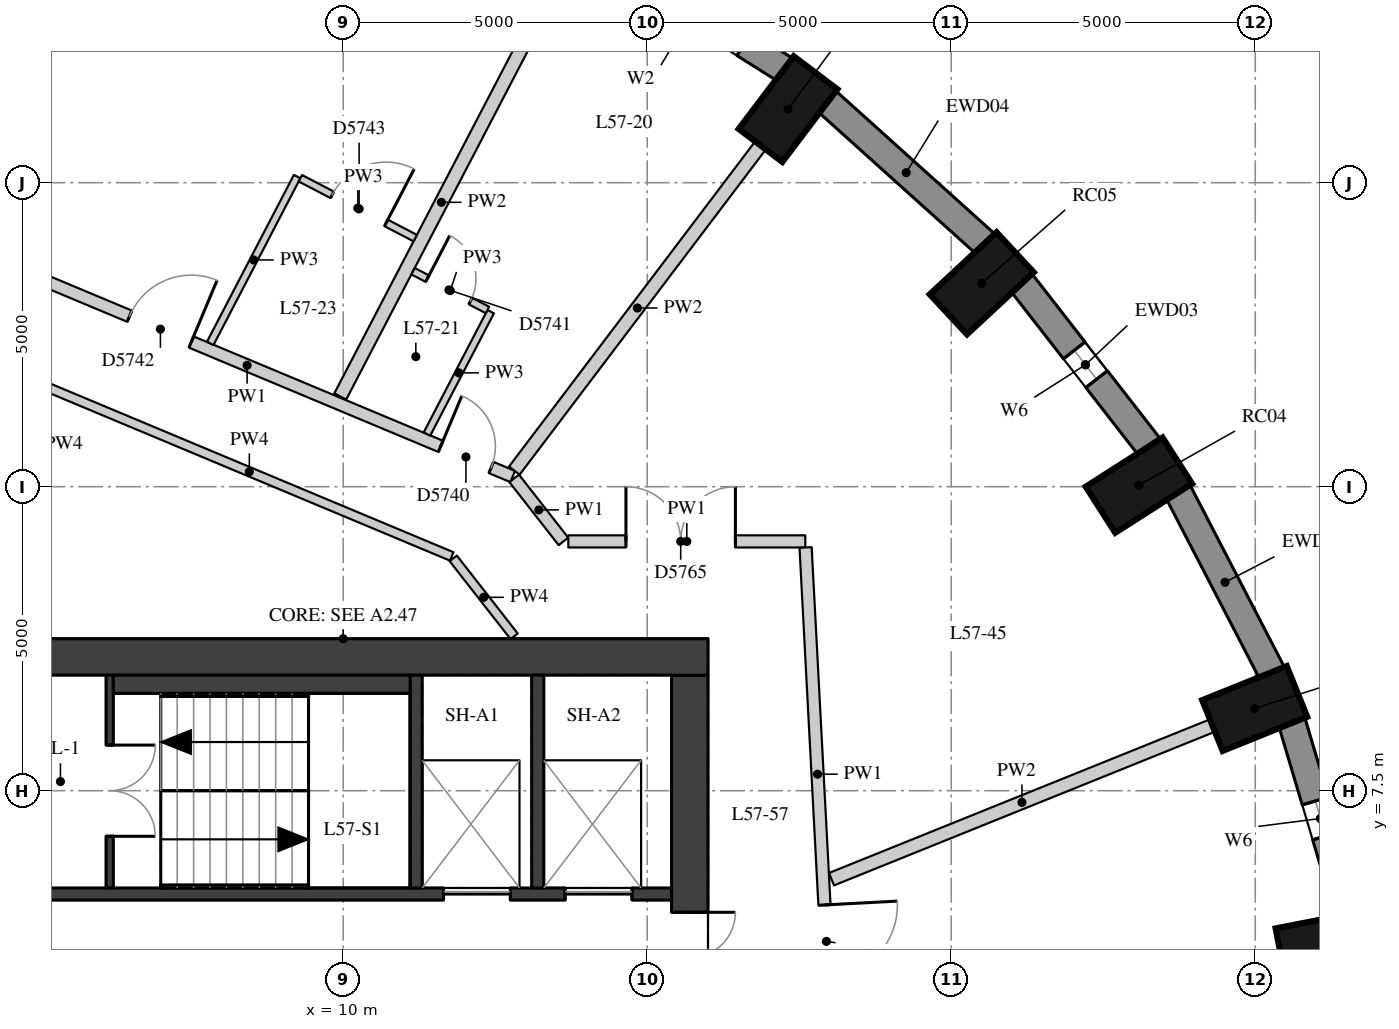
"""IFC4 building model, lengths in metres.
Left out: names, types, materials, properties, quantities, classifications, styles, units other than length and angle.
Written with IfcOpenShell. Run it as: python <this file> out.ifc"""

import sys

from ifc_helpers import new_model, si_unit, direction, frame, frame_2d, origin, origin_2d, place, context, subcontext, project, spatial, rectangle, extrude, element, fill, save


model = new_model("IFC4")
c1 = context("Model", 3, precision=1e-05, world=origin(), true_north=direction((0.0, 1.0)))
c2 = subcontext(c1, "Body", "Model", "MODEL_VIEW")
j1 = project(units=[si_unit("LENGTHUNIT", "METRE"), si_unit("PLANEANGLEUNIT", "RADIAN")], contexts=[c1])
p1 = place(None, origin())
s1 = spatial("IfcSite", under=j1, at=p1, CompositionType="ELEMENT")
p2 = place(p1, origin())
s2 = spatial("IfcBuilding", under=s1, at=p2, CompositionType="ELEMENT")
p3 = place(p2, frame((0.0, 0.0, 202.4)))
s3 = spatial("IfcBuildingStorey", under=s2, at=p3, CompositionType="ELEMENT", Elevation=202.4)
for number, where, z_axis, x_axis in (
    (1, (26.157, 4.937, 0.0), (0.0, 0.0, 1.0), (0.981, 0.192, 0.0)),
    (2, (24.991, 8.852, 0.0), (0.0, 0.0, 1.0), (0.927, 0.374, 0.0)),
    (3, (23.087, 12.525, 0.0), (0.0, 0.0, 1.0), (0.842, 0.539, 0.0)),
    (4, (20.502, 15.845, 0.0), (0.0, 0.0, 1.0), (0.732, 0.681, 0.0)),
    (5, (17.316, 18.71, 0.0), (0.0, 0.0, 1.0), (0.604, 0.797, 0.0)),
):
    element("IfcColumn", number, at=place(p3, frame(where, z_axis=z_axis, x_axis=x_axis)), inside=s3, PredefinedType="COLUMN", context=c2, shape_type="SweptSolid", body=[
        extrude(rectangle(XDim=1.5, YDim=0.9, at=origin_2d()), origin(), (0.0, 0.0, 1.0), 3.3),
    ])
p4 = place(p3, frame((26.548, 5.452, 0.0), z_axis=(0.0, 0.0, 1.0), x_axis=(-0.285444972963, 0.958395099847, 0.0)))
e6 = element("IfcWall", 6, at=p4, inside=s3, PredefinedType="SOLIDWALL", context=c2, shape_type="SweptSolid", body=[
    extrude(rectangle(XDim=3.32, YDim=0.45, at=frame_2d((1.66, 0.0))), origin(), (0.0, 0.0, 1.0), 3.02),
])
p5 = place(p4, frame((1.36, 0.0, 0.4)))
e7 = element("IfcOpeningElement", 7, at=p5, cuts=e6, PredefinedType="OPENING", context=c2, shape_type="SweptSolid", body=[
    extrude(rectangle(XDim=0.6, YDim=1.75, at=frame_2d((0.3, 0.875))), frame((0.0, 0.235, 0.0), z_axis=(0.0, -1.0, 0.0), x_axis=(1.0, 0.0, 0.0)), (0.0, 0.0, 1.0), 0.47),
])
p6 = place(p3, frame((25.278, 9.432, 0.0), z_axis=(0.0, 0.0, 1.0), x_axis=(-0.460175500475, 0.887827972505, 0.0)))
e8 = element("IfcWall", 8, at=p6, inside=s3, PredefinedType="SOLIDWALL", context=c2, shape_type="SweptSolid", body=[
    extrude(rectangle(XDim=3.371, YDim=0.45, at=frame_2d((1.685, 0.0))), origin(), (0.0, 0.0, 1.0), 3.02),
])
p7 = place(p3, frame((23.263, 13.148, 0.0), z_axis=(0.0, 0.0, 1.0), x_axis=(-0.614220816451, 0.789134201919, 0.0)))
e9 = element("IfcWall", 9, at=p7, inside=s3, PredefinedType="SOLIDWALL", context=c2, shape_type="SweptSolid", body=[
    extrude(rectangle(XDim=3.438, YDim=0.45, at=frame_2d((1.719, 0.0))), origin(), (0.0, 0.0, 1.0), 3.02),
])
p8 = place(p7, frame((1.419, 0.0, 0.4)))
e10 = element("IfcOpeningElement", 10, at=p8, cuts=e9, PredefinedType="OPENING", context=c2, shape_type="SweptSolid", body=[
    extrude(rectangle(XDim=0.6, YDim=1.75, at=frame_2d((0.3, 0.875))), frame((0.0, 0.235, 0.0), z_axis=(0.0, -1.0, 0.0), x_axis=(1.0, 0.0, 0.0)), (0.0, 0.0, 1.0), 0.47),
])
p9 = place(p3, frame((20.565, 16.49, 0.0), z_axis=(0.0, 0.0, 1.0), x_axis=(-0.743442727602, 0.668799604348, 0.0)))
e11 = element("IfcWall", 11, at=p9, inside=s3, PredefinedType="SOLIDWALL", context=c2, shape_type="SweptSolid", body=[
    extrude(rectangle(XDim=3.513, YDim=0.45, at=frame_2d((1.756, 0.0))), origin(), (0.0, 0.0, 1.0), 3.02),
])
p10 = place(p3, frame((17.267, 19.358, 0.0), z_axis=(0.0, 0.0, 1.0), x_axis=(-0.846119146727, 0.532993798783, 0.0)))
e12 = element("IfcWall", 12, at=p10, inside=s3, PredefinedType="SOLIDWALL", context=c2, shape_type="SweptSolid", body=[
    extrude(rectangle(XDim=3.587, YDim=0.45, at=frame_2d((1.793, 0.0))), origin(), (0.0, 0.0, 1.0), 3.02),
])
p11 = place(p10, frame((0.793, 0.0, 0.4)))
e13 = element("IfcOpeningElement", 13, at=p11, cuts=e12, PredefinedType="OPENING", context=c2, shape_type="SweptSolid", body=[
    extrude(rectangle(XDim=2.0, YDim=1.75, at=frame_2d((1.0, 0.875))), frame((0.0, 0.235, 0.0), z_axis=(0.0, -1.0, 0.0), x_axis=(1.0, 0.0, 0.0)), (0.0, 0.0, 1.0), 0.47),
])
p12 = place(p3, frame((15.7, -9.4, 0.0), z_axis=(0.0, 0.0, 1.0), x_axis=(0.0, 1.0, 0.0)))
e14 = element("IfcWall", 14, at=p12, inside=s3, PredefinedType="SHEAR", context=c2, shape_type="SweptSolid", body=[
    extrude(rectangle(XDim=18.8, YDim=0.6, at=frame_2d((9.4, 0.0))), origin(), (0.0, 0.0, 1.0), 3.02),
])
p13 = place(p12, frame((13.4, 0.0, 0.0)))
e15 = element("IfcOpeningElement", 15, at=p13, cuts=e14, PredefinedType="OPENING", context=c2, shape_type="SweptSolid", body=[
    extrude(rectangle(XDim=1.5, YDim=2.1, at=frame_2d((0.75, 1.05))), frame((0.0, 0.31, 0.0), z_axis=(0.0, -1.0, 0.0), x_axis=(1.0, 0.0, 0.0)), (0.0, 0.0, 1.0), 0.62),
])
p14 = place(p12, frame((3.9, 0.0, 0.0)))
e16 = element("IfcOpeningElement", 16, at=p14, cuts=e14, PredefinedType="OPENING", context=c2, shape_type="SweptSolid", body=[
    extrude(rectangle(XDim=1.5, YDim=2.1, at=frame_2d((0.75, 1.05))), frame((0.0, 0.31, 0.0), z_axis=(0.0, -1.0, 0.0), x_axis=(1.0, 0.0, 0.0)), (0.0, 0.0, 1.0), 0.62),
])
p15 = place(p3, frame((4.0, 9.7, 0.0), z_axis=(0.0, 0.0, 1.0), x_axis=(1.0, 0.0, 0.0)))
e17 = element("IfcWall", 17, at=p15, inside=s3, PredefinedType="SHEAR", context=c2, shape_type="SweptSolid", body=[
    extrude(rectangle(XDim=12.0, YDim=0.6, at=frame_2d((6.0, 0.0))), origin(), (0.0, 0.0, 1.0), 3.02),
])
p16 = place(p3, frame((4.6, 5.8, 0.0), z_axis=(0.0, 0.0, 1.0), x_axis=(1.0, 0.0, 0.0)))
e18 = element("IfcWall", 18, at=p16, inside=s3, PredefinedType="SHEAR", context=c2, shape_type="SweptSolid", body=[
    extrude(rectangle(XDim=10.8, YDim=0.2, at=frame_2d((5.4, 0.0))), origin(), (0.0, 0.0, 1.0), 3.02),
])
p17 = place(p16, frame((7.05, 0.0, 0.0)))
e19 = element("IfcOpeningElement", 19, at=p17, cuts=e18, PredefinedType="OPENING", context=c2, shape_type="SweptSolid", body=[
    extrude(rectangle(XDim=1.1, YDim=2.1, at=frame_2d((0.55, 1.05))), frame((0.0, 0.11, 0.0), z_axis=(0.0, -1.0, 0.0), x_axis=(1.0, 0.0, 0.0)), (0.0, 0.0, 1.0), 0.22),
])
p18 = place(p16, frame((9.05, 0.0, 0.0)))
e20 = element("IfcOpeningElement", 20, at=p18, cuts=e18, PredefinedType="OPENING", context=c2, shape_type="SweptSolid", body=[
    extrude(rectangle(XDim=1.1, YDim=2.1, at=frame_2d((0.55, 1.05))), frame((0.0, 0.11, 0.0), z_axis=(0.0, -1.0, 0.0), x_axis=(1.0, 0.0, 0.0)), (0.0, 0.0, 1.0), 0.22),
])
for number, where, z_axis, x_axis in (
    (21, (11.2, 5.9, 0.0), (0.0, 0.0, 1.0), (0.0, 1.0, 0.0)),
    (22, (13.2, 5.9, 0.0), (0.0, 0.0, 1.0), (0.0, 1.0, 0.0)),
):
    element("IfcWall", number, at=place(p3, frame(where, z_axis=z_axis, x_axis=x_axis)), inside=s3, PredefinedType="SHEAR", context=c2, shape_type="SweptSolid", body=[
        extrude(rectangle(XDim=3.5, YDim=0.2, at=frame_2d((1.75, 0.0))), origin(), (0.0, 0.0, 1.0), 3.02),
    ])
p19 = place(p3, frame((6.16, 5.9, 0.0), z_axis=(0.0, 0.0, 1.0), x_axis=(0.0, 1.0, 0.0)))
e23 = element("IfcWall", 23, at=p19, inside=s3, PredefinedType="SHEAR", context=c2, shape_type="SweptSolid", body=[
    extrude(rectangle(XDim=3.5, YDim=0.12, at=frame_2d((1.75, 0.0))), origin(), (0.0, 0.0, 1.0), 3.02),
])
p20 = place(p19, frame((0.85, 0.0, 0.0)))
e24 = element("IfcOpeningElement", 24, at=p20, cuts=e23, PredefinedType="OPENING", context=c2, shape_type="SweptSolid", body=[
    extrude(rectangle(XDim=1.5, YDim=2.1, at=frame_2d((0.75, 1.05))), frame((0.0, 0.07, 0.0), z_axis=(0.0, -1.0, 0.0), x_axis=(1.0, 0.0, 0.0)), (0.0, 0.0, 1.0), 0.14),
])
p21 = place(p3, frame((6.22, 9.25, 0.0), z_axis=(0.0, 0.0, 1.0), x_axis=(1.0, 0.0, 0.0)))
e25 = element("IfcWall", 25, at=p21, inside=s3, PredefinedType="PARTITIONING", context=c2, shape_type="SweptSolid", body=[
    extrude(rectangle(XDim=4.88, YDim=0.3, at=frame_2d((2.44, 0.0))), origin(), (0.0, 0.0, 1.0), 3.02),
])
p22 = place(p3, frame((4.052, 16.323, 0.0), z_axis=(0.0, 0.0, 1.0), x_axis=(0.922513794011, -0.385964117322, 0.0)))
e26 = element("IfcWall", 26, at=p22, inside=s3, PredefinedType="PARTITIONING", context=c2, shape_type="SweptSolid", body=[
    extrude(rectangle(XDim=9.47, YDim=0.2, at=frame_2d((4.735, 0.0))), origin(), (0.0, 0.0, 1.0), 3.02),
])
p23 = place(p22, frame((8.186, 0.0, 0.0)))
e27 = element("IfcOpeningElement", 27, at=p23, cuts=e26, PredefinedType="OPENING", context=c2, shape_type="SweptSolid", body=[
    extrude(rectangle(XDim=0.9, YDim=2.1, at=frame_2d((0.45, 1.05))), frame((0.0, 0.11, 0.0), z_axis=(0.0, -1.0, 0.0), x_axis=(1.0, 0.0, 0.0)), (0.0, 0.0, 1.0), 0.22),
])
p24 = place(p22, frame((2.639, 0.0, 0.0)))
e28 = element("IfcOpeningElement", 28, at=p24, cuts=e26, PredefinedType="OPENING", context=c2, shape_type="SweptSolid", body=[
    extrude(rectangle(XDim=1.1, YDim=2.1, at=frame_2d((0.55, 1.05))), frame((0.0, 0.11, 0.0), z_axis=(0.0, -1.0, 0.0), x_axis=(1.0, 0.0, 0.0)), (0.0, 0.0, 1.0), 0.22),
])
p25 = place(p3, frame((12.812, 12.636, 0.0), z_axis=(0.0, 0.0, 1.0), x_axis=(0.616123044723, -0.787649918277, 0.0)))
e29 = element("IfcWall", 29, at=p25, inside=s3, PredefinedType="PARTITIONING", context=c2, shape_type="SweptSolid", body=[
    extrude(rectangle(XDim=1.315, YDim=0.2, at=frame_2d((0.658, 0.0))), origin(), (0.0, 0.0, 1.0), 3.02),
])
p26 = place(p3, frame((13.703, 11.6, 0.0), z_axis=(0.0, 0.0, 1.0), x_axis=(1.0, 0.0, 0.0)))
e30 = element("IfcWall", 30, at=p26, inside=s3, PredefinedType="PARTITIONING", context=c2, shape_type="SweptSolid", body=[
    extrude(rectangle(XDim=3.897, YDim=0.2, at=frame_2d((1.949, 0.0))), origin(), (0.0, 0.0, 1.0), 3.02),
])
p27 = place(p26, frame((0.948, 0.0, 0.0)))
e31 = element("IfcOpeningElement", 31, at=p27, cuts=e30, PredefinedType="OPENING", context=c2, shape_type="SweptSolid", body=[
    extrude(rectangle(XDim=1.8, YDim=2.1, at=frame_2d((0.9, 1.05))), frame((0.0, 0.11, 0.0), z_axis=(0.0, -1.0, 0.0), x_axis=(1.0, 0.0, 0.0)), (0.0, 0.0, 1.0), 0.22),
])
p28 = place(p3, frame((17.605, 11.5, 0.0), z_axis=(0.0, 0.0, 1.0), x_axis=(0.052701255232, -0.998610323248, 0.0)))
e32 = element("IfcWall", 32, at=p28, inside=s3, PredefinedType="PARTITIONING", context=c2, shape_type="SweptSolid", body=[
    extrude(rectangle(XDim=7.468, YDim=0.2, at=frame_2d((3.734, 0.0))), origin(), (0.0, 0.0, 1.0), 3.02),
])
p29 = place(p28, frame((5.887, 0.0, 0.0)))
e33 = element("IfcOpeningElement", 33, at=p29, cuts=e32, PredefinedType="OPENING", context=c2, shape_type="SweptSolid", body=[
    extrude(rectangle(XDim=1.2, YDim=2.1, at=frame_2d((0.6, 1.05))), frame((0.0, 0.11, 0.0), z_axis=(0.0, -1.0, 0.0), x_axis=(1.0, 0.0, 0.0)), (0.0, 0.0, 1.0), 0.22),
])
p30 = place(p3, frame((5.128, 14.138, 0.0), z_axis=(0.0, 0.0, 1.0), x_axis=(0.922514397623, -0.385962674591, 0.0)))
e34 = element("IfcWall", 34, at=p30, inside=s3, PredefinedType="PARTITIONING", context=c2, shape_type="SweptSolid", body=[
    extrude(rectangle(XDim=7.216, YDim=0.15, at=frame_2d((3.608, 0.0))), origin(), (0.0, 0.0, 1.0), 3.02),
])
p31 = place(p3, frame((11.81, 11.321, 0.0), z_axis=(0.0, 0.0, 1.0), x_axis=(0.615964296608, -0.787774069962, 0.0)))
e35 = element("IfcWall", 35, at=p31, inside=s3, PredefinedType="PARTITIONING", context=c2, shape_type="SweptSolid", body=[
    extrude(rectangle(XDim=1.627, YDim=0.15, at=frame_2d((0.813, 0.0))), origin(), (0.0, 0.0, 1.0), 3.02),
])
p32 = place(p3, frame((24.295, 8.571, 0.0), z_axis=(0.0, 0.0, 1.0), x_axis=(-0.927395972896, -0.374081153571, 0.0)))
e36 = element("IfcWall", 36, at=p32, inside=s3, PredefinedType="PARTITIONING", context=c2, shape_type="SweptSolid", body=[
    extrude(rectangle(XDim=6.755, YDim=0.22, at=frame_2d((3.377, 0.0))), origin(), (0.0, 0.0, 1.0), 3.02),
])
p33 = place(p3, frame((16.863, 18.113, 0.0), z_axis=(0.0, 0.0, 1.0), x_axis=(-0.603604669643, -0.797283765535, 0.0)))
e37 = element("IfcWall", 37, at=p33, inside=s3, PredefinedType="PARTITIONING", context=c2, shape_type="SweptSolid", body=[
    extrude(rectangle(XDim=6.707, YDim=0.22, at=frame_2d((3.354, 0.0))), origin(), (0.0, 0.0, 1.0), 3.02),
])
p34 = place(p3, frame((13.279, 20.37, 0.0), z_axis=(0.0, 0.0, 1.0), x_axis=(-0.462003878414, -0.886877903846, 0.0)))
e38 = element("IfcWall", 38, at=p34, inside=s3, PredefinedType="PARTITIONING", context=c2, shape_type="SweptSolid", body=[
    extrude(rectangle(XDim=7.2, YDim=0.22, at=frame_2d((3.6, 0.0))), origin(), (0.0, 0.0, 1.0), 3.02),
])
p35 = place(p3, frame((11.378, 13.366, 0.0), z_axis=(0.0, 0.0, 1.0), x_axis=(0.461999655972, 0.886880103442, 0.0)))
e39 = element("IfcWall", 39, at=p35, inside=s3, PredefinedType="PARTITIONING", context=c2, shape_type="SweptSolid", body=[
    extrude(rectangle(XDim=2.269, YDim=0.12, at=frame_2d((1.135, 0.0))), origin(), (0.0, 0.0, 1.0), 3.02),
])
p36 = place(p3, frame((7.814, 14.857, 0.0), z_axis=(0.0, 0.0, 1.0), x_axis=(0.461958994047, 0.886901284146, 0.0)))
e40 = element("IfcWall", 40, at=p36, inside=s3, PredefinedType="PARTITIONING", context=c2, shape_type="SweptSolid", body=[
    extrude(rectangle(XDim=3.093, YDim=0.12, at=frame_2d((1.547, 0.0))), origin(), (0.0, 0.0, 1.0), 3.02),
])
p37 = place(p3, frame((12.373, 15.406, 0.0), z_axis=(0.0, 0.0, 1.0), x_axis=(-0.88690955386, 0.461943116922, 0.0)))
e41 = element("IfcWall", 41, at=p37, inside=s3, PredefinedType="PARTITIONING", context=c2, shape_type="SweptSolid", body=[
    extrude(rectangle(XDim=1.38, YDim=0.12, at=frame_2d((0.69, 0.0))), origin(), (0.0, 0.0, 1.0), 3.02),
])
p38 = place(p37, frame((0.315, 0.0, 0.0)))
e42 = element("IfcOpeningElement", 42, at=p38, cuts=e41, PredefinedType="OPENING", context=c2, shape_type="SweptSolid", body=[
    extrude(rectangle(XDim=0.8, YDim=2.1, at=frame_2d((0.4, 1.05))), frame((0.0, 0.07, 0.0), z_axis=(0.0, -1.0, 0.0), x_axis=(1.0, 0.0, 0.0)), (0.0, 0.0, 1.0), 0.14),
])
p39 = place(p3, frame((9.296, 17.573, 0.0), z_axis=(0.0, 0.0, 1.0), x_axis=(0.88685243949, -0.462052757346, 0.0)))
e43 = element("IfcWall", 43, at=p39, inside=s3, PredefinedType="PARTITIONING", context=c2, shape_type="SweptSolid", body=[
    extrude(rectangle(XDim=2.13, YDim=0.12, at=frame_2d((1.065, 0.0))), origin(), (0.0, 0.0, 1.0), 3.02),
])
p40 = place(p39, frame((0.59, 0.0, 0.0)))
e44 = element("IfcOpeningElement", 44, at=p40, cuts=e43, PredefinedType="OPENING", context=c2, shape_type="SweptSolid", body=[
    extrude(rectangle(XDim=1.0, YDim=2.1, at=frame_2d((0.5, 1.05))), frame((0.0, 0.07, 0.0), z_axis=(0.0, -1.0, 0.0), x_axis=(1.0, 0.0, 0.0)), (0.0, 0.0, 1.0), 0.14),
])
p41 = place(p5, origin())
e45 = element("IfcWindow", 45, at=p41, inside=s3, PartitioningType="SINGLE_PANEL", PredefinedType="WINDOW", context=c2, shape_type="SweptSolid", body=[
    extrude(rectangle(XDim=0.6, YDim=1.75, at=frame_2d((0.3, 0.875))), frame((0.0, 0.035, 0.0), z_axis=(0.0, -1.0, 0.0), x_axis=(1.0, 0.0, 0.0)), (0.0, 0.0, 1.0), 0.06),
])
fill(e7, e45)
p42 = place(p8, origin())
e46 = element("IfcWindow", 46, at=p42, inside=s3, PartitioningType="SINGLE_PANEL", PredefinedType="WINDOW", context=c2, shape_type="SweptSolid", body=[
    extrude(rectangle(XDim=0.6, YDim=1.75, at=frame_2d((0.3, 0.875))), frame((0.0, 0.035, 0.0), z_axis=(0.0, -1.0, 0.0), x_axis=(1.0, 0.0, 0.0)), (0.0, 0.0, 1.0), 0.06),
])
fill(e10, e46)
p43 = place(p13, origin())
e47 = element("IfcDoor", 47, at=p43, inside=s3, OperationType="DOUBLE_DOOR_SINGLE_SWING", PredefinedType="DOOR", context=c2, shape_type="SweptSolid", body=[
    extrude(rectangle(XDim=1.5, YDim=2.1, at=frame_2d((0.75, 1.05))), frame((0.0, 0.025, 0.0), z_axis=(0.0, -1.0, 0.0), x_axis=(1.0, 0.0, 0.0)), (0.0, 0.0, 1.0), 0.05),
])
fill(e15, e47)
p44 = place(p20, origin())
e48 = element("IfcDoor", 48, at=p44, inside=s3, OperationType="DOUBLE_DOOR_SINGLE_SWING", PredefinedType="DOOR", context=c2, shape_type="SweptSolid", body=[
    extrude(rectangle(XDim=1.5, YDim=2.1, at=frame_2d((0.75, 1.05))), frame((0.0, 0.025, 0.0), z_axis=(0.0, -1.0, 0.0), x_axis=(1.0, 0.0, 0.0)), (0.0, 0.0, 1.0), 0.05),
])
fill(e24, e48)
p45 = place(p17, origin())
e49 = element("IfcDoor", 49, at=p45, inside=s3, OperationType="DOUBLE_DOOR_SLIDING", PredefinedType="DOOR", context=c2, shape_type="SweptSolid", body=[
    extrude(rectangle(XDim=1.1, YDim=2.1, at=frame_2d((0.55, 1.05))), frame((0.0, 0.025, 0.0), z_axis=(0.0, -1.0, 0.0), x_axis=(1.0, 0.0, 0.0)), (0.0, 0.0, 1.0), 0.05),
])
fill(e19, e49)
p46 = place(p18, origin())
e50 = element("IfcDoor", 50, at=p46, inside=s3, OperationType="DOUBLE_DOOR_SLIDING", PredefinedType="DOOR", context=c2, shape_type="SweptSolid", body=[
    extrude(rectangle(XDim=1.1, YDim=2.1, at=frame_2d((0.55, 1.05))), frame((0.0, 0.025, 0.0), z_axis=(0.0, -1.0, 0.0), x_axis=(1.0, 0.0, 0.0)), (0.0, 0.0, 1.0), 0.05),
])
fill(e20, e50)
p47 = place(p23, origin())
e51 = element("IfcDoor", 51, at=p47, inside=s3, OperationType="SINGLE_SWING_LEFT", PredefinedType="DOOR", context=c2, shape_type="SweptSolid", body=[
    extrude(rectangle(XDim=0.9, YDim=2.1, at=frame_2d((0.45, 1.05))), frame((0.0, 0.025, 0.0), z_axis=(0.0, -1.0, 0.0), x_axis=(1.0, 0.0, 0.0)), (0.0, 0.0, 1.0), 0.05),
])
fill(e27, e51)
p48 = place(p38, origin())
e52 = element("IfcDoor", 52, at=p48, inside=s3, OperationType="SINGLE_SWING_LEFT", PredefinedType="DOOR", context=c2, shape_type="SweptSolid", body=[
    extrude(rectangle(XDim=0.8, YDim=2.1, at=frame_2d((0.4, 1.05))), frame((0.0, 0.025, 0.0), z_axis=(0.0, -1.0, 0.0), x_axis=(1.0, 0.0, 0.0)), (0.0, 0.0, 1.0), 0.05),
])
fill(e42, e52)
p49 = place(p24, origin())
e53 = element("IfcDoor", 53, at=p49, inside=s3, OperationType="SINGLE_SWING_RIGHT", PredefinedType="DOOR", context=c2, shape_type="SweptSolid", body=[
    extrude(rectangle(XDim=1.1, YDim=2.1, at=frame_2d((0.55, 1.05))), frame((0.0, 0.025, 0.0), z_axis=(0.0, -1.0, 0.0), x_axis=(1.0, 0.0, 0.0)), (0.0, 0.0, 1.0), 0.05),
])
fill(e28, e53)
p50 = place(p40, origin())
e54 = element("IfcDoor", 54, at=p50, inside=s3, OperationType="SINGLE_SWING_RIGHT", PredefinedType="DOOR", context=c2, shape_type="SweptSolid", body=[
    extrude(rectangle(XDim=1.0, YDim=2.1, at=frame_2d((0.5, 1.05))), frame((0.0, 0.025, 0.0), z_axis=(0.0, -1.0, 0.0), x_axis=(1.0, 0.0, 0.0)), (0.0, 0.0, 1.0), 0.05),
])
fill(e44, e54)
p51 = place(p29, origin())
e55 = element("IfcDoor", 55, at=p51, inside=s3, OperationType="SINGLE_SWING_LEFT", PredefinedType="DOOR", context=c2, shape_type="SweptSolid", body=[
    extrude(rectangle(XDim=1.2, YDim=2.1, at=frame_2d((0.6, 1.05))), frame((0.0, 0.025, 0.0), z_axis=(0.0, -1.0, 0.0), x_axis=(1.0, 0.0, 0.0)), (0.0, 0.0, 1.0), 0.05),
])
fill(e33, e55)
p52 = place(p27, origin())
e56 = element("IfcDoor", 56, at=p52, inside=s3, OperationType="DOUBLE_DOOR_SINGLE_SWING", PredefinedType="DOOR", context=c2, shape_type="SweptSolid", body=[
    extrude(rectangle(XDim=1.8, YDim=2.1, at=frame_2d((0.9, 1.05))), frame((0.0, 0.025, 0.0), z_axis=(0.0, -1.0, 0.0), x_axis=(1.0, 0.0, 0.0)), (0.0, 0.0, 1.0), 0.05),
])
fill(e31, e56)
save(model, sys.argv[1])
